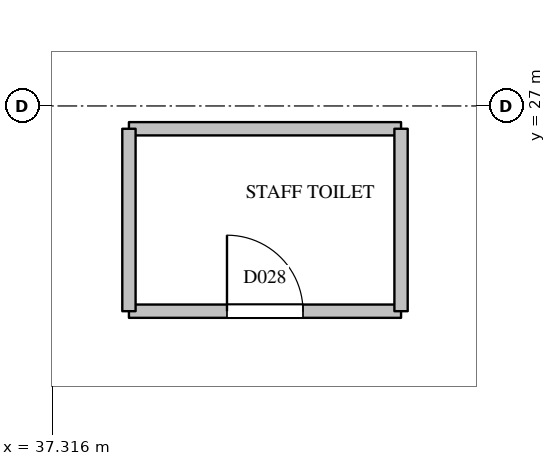
"""IFC4 building model, lengths in metres.
Left out: names, types, materials, properties, quantities, classifications, styles, units other than length and angle.
Written with IfcOpenShell. Run it as: python <this file> out.ifc"""

import sys

from ifc_helpers import new_model, si_unit, direction, frame, frame_2d, origin, place, context, subcontext, project, spatial, rectangle, extrude, element, fill, save


model = new_model("IFC4")
c1 = context("Model", 3, precision=1e-05, world=origin(), true_north=direction((0.0, 1.0)))
c2 = subcontext(c1, "Body", "Model", "MODEL_VIEW")
j1 = project(units=[si_unit("LENGTHUNIT", "METRE"), si_unit("PLANEANGLEUNIT", "RADIAN")], contexts=[c1])
p1 = place(None, origin())
s1 = spatial("IfcSite", under=j1, at=p1, CompositionType="ELEMENT")
p2 = place(p1, origin())
s2 = spatial("IfcBuilding", under=s1, at=p2, CompositionType="ELEMENT")
p3 = place(p2, frame((0.0, 0.0, 34.8)))
s3 = spatial("IfcBuildingStorey", under=s2, at=p3, CompositionType="ELEMENT", Elevation=34.8)
p4 = place(p3, frame((38.32, 24.3, 0.0), z_axis=(0.0, 0.0, 1.0), x_axis=(1.0, 0.0, 0.0)))
e1 = element("IfcWall", 1, at=p4, inside=s3, PredefinedType="PARTITIONING", context=c2, shape_type="SweptSolid", body=[
    extrude(rectangle(XDim=3.58, YDim=0.175, at=frame_2d((1.79, 0.0))), origin(), (0.0, 0.0, 1.0), 3.5),
])
p5 = place(p4, frame((1.29, 0.0, 0.0)))
e2 = element("IfcOpeningElement", 2, at=p5, cuts=e1, PredefinedType="OPENING", context=c2, shape_type="SweptSolid", body=[
    extrude(rectangle(XDim=1.0, YDim=2.1, at=frame_2d((0.5, 1.05))), frame((0.0, 0.097, 0.0), z_axis=(0.0, -1.0, 0.0), x_axis=(1.0, 0.0, 0.0)), (0.0, 0.0, 1.0), 0.195),
])
p6 = place(p3, frame((38.32, 26.7, 0.0), z_axis=(0.0, 0.0, 1.0), x_axis=(1.0, 0.0, 0.0)))
e3 = element("IfcWall", 3, at=p6, inside=s3, PredefinedType="PARTITIONING", context=c2, shape_type="SweptSolid", body=[
    extrude(rectangle(XDim=3.58, YDim=0.175, at=frame_2d((1.79, 0.0))), origin(), (0.0, 0.0, 1.0), 2.5),
])
for number, where, z_axis, x_axis in (
    (4, (38.32, 24.3, 0.0), (0.0, 0.0, 1.0), (0.0, 1.0, 0.0)),
    (5, (41.9, 24.3, 0.0), (0.0, 0.0, 1.0), (0.0, 1.0, 0.0)),
):
    element("IfcWall", number, at=place(p3, frame(where, z_axis=z_axis, x_axis=x_axis)), inside=s3, PredefinedType="PARTITIONING", context=c2, shape_type="SweptSolid", body=[
        extrude(rectangle(XDim=2.4, YDim=0.175, at=frame_2d((1.2, 0.0))), origin(), (0.0, 0.0, 1.0), 2.5),
    ])
p7 = place(p5, origin())
e6 = element("IfcDoor", 6, at=p7, inside=s3, OperationType="SINGLE_SWING_LEFT", PredefinedType="DOOR", context=c2, shape_type="SweptSolid", body=[
    extrude(rectangle(XDim=1.0, YDim=2.1, at=frame_2d((0.5, 1.05))), frame((0.0, 0.025, 0.0), z_axis=(0.0, -1.0, 0.0), x_axis=(1.0, 0.0, 0.0)), (0.0, 0.0, 1.0), 0.05),
])
fill(e2, e6)
save(model, sys.argv[1])
